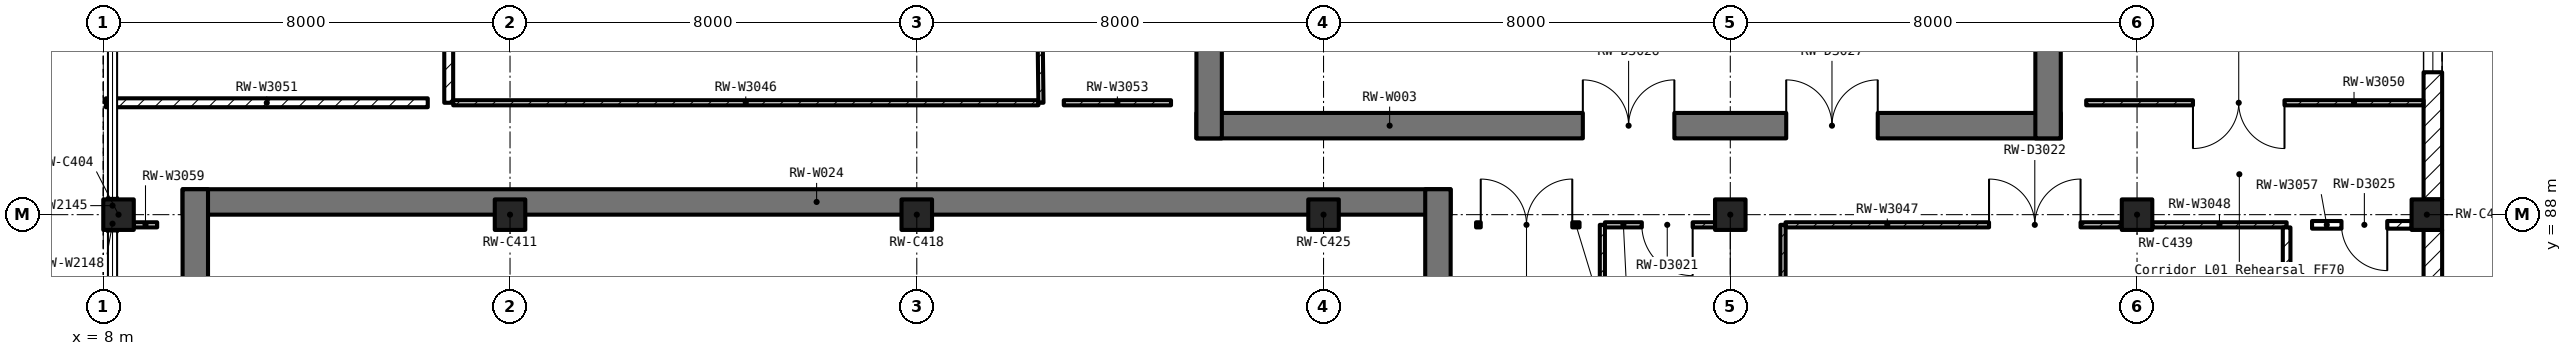
"""IFC4 building model, lengths in metres.
Left out: names, types, materials, properties, quantities, classifications, styles, units other than length and angle.
Written with IfcOpenShell. Run it as: python <this file> out.ifc"""

import sys

from ifc_helpers import new_model, si_unit, direction, frame, frame_2d, origin, origin_2d, place, context, subcontext, project, spatial, rectangle, extrude, element, fill, save


model = new_model("IFC4")
c1 = context("Model", 3, precision=1e-05, world=origin(), true_north=direction((0.0, 1.0)))
c2 = subcontext(c1, "Body", "Model", "MODEL_VIEW")
j1 = project(units=[si_unit("LENGTHUNIT", "METRE"), si_unit("PLANEANGLEUNIT", "RADIAN")], contexts=[c1])
p1 = place(None, origin())
s1 = spatial("IfcSite", under=j1, at=p1, CompositionType="ELEMENT")
p2 = place(p1, origin())
s2 = spatial("IfcBuilding", under=s1, at=p2, CompositionType="ELEMENT")
p3 = place(p2, frame((0.0, 0.0, 6.0)))
s3 = spatial("IfcBuildingStorey", under=s2, at=p3, CompositionType="ELEMENT", Elevation=6.0)
for number, where, z_axis, x_axis in (
    (1, (8.3, 88.0, 0.0), (0.0, 0.0, 1.0), (1.0, 0.0, 0.0)),
    (2, (16.0, 88.0, 0.0), (0.0, 0.0, 1.0), (1.0, 0.0, 0.0)),
    (3, (24.0, 88.0, 0.0), (0.0, 0.0, 1.0), (1.0, 0.0, 0.0)),
    (4, (32.0, 88.0, 0.0), (0.0, 0.0, 1.0), (1.0, 0.0, 0.0)),
    (5, (40.0, 88.0, 0.0), (0.0, 0.0, 1.0), (1.0, 0.0, 0.0)),
    (6, (48.0, 88.0, 0.0), (0.0, 0.0, 1.0), (1.0, 0.0, 0.0)),
    (7, (53.7, 88.0, 0.0), (0.0, 0.0, 1.0), (1.0, 0.0, 0.0)),
):
    element("IfcColumn", number, at=place(p3, frame(where, z_axis=z_axis, x_axis=x_axis)), inside=s3, PredefinedType="COLUMN", context=c2, shape_type="SweptSolid", body=[
        extrude(rectangle(XDim=0.6, YDim=0.6, at=origin_2d()), origin(), (0.0, 0.0, 1.0), 5.5),
    ])
p4 = place(p3, frame((29.5, 89.75, 0.0), z_axis=(0.0, 0.0, 1.0), x_axis=(1.0, 0.0, 0.0)))
e8 = element("IfcWall", 8, at=p4, inside=s3, PredefinedType="SHEAR", context=c2, shape_type="SweptSolid", body=[
    extrude(rectangle(XDim=17.0, YDim=0.5, at=frame_2d((8.5, 0.0))), origin(), (0.0, 0.0, 1.0), 5.5),
])
p5 = place(p4, frame((7.6, 0.0, 0.0)))
e9 = element("IfcOpeningElement", 9, at=p5, cuts=e8, PredefinedType="OPENING", context=c2, shape_type="SweptSolid", body=[
    extrude(rectangle(XDim=1.8, YDim=2.1, at=frame_2d((0.9, 1.05))), frame((0.0, 0.262, 0.0), z_axis=(0.0, -1.0, 0.0), x_axis=(1.0, 0.0, 0.0)), (0.0, 0.0, 1.0), 0.524),
])
p6 = place(p4, frame((11.6, 0.0, 0.0)))
e10 = element("IfcOpeningElement", 10, at=p6, cuts=e8, PredefinedType="OPENING", context=c2, shape_type="SweptSolid", body=[
    extrude(rectangle(XDim=1.8, YDim=2.1, at=frame_2d((0.9, 1.05))), frame((0.0, 0.262, 0.0), z_axis=(0.0, -1.0, 0.0), x_axis=(1.0, 0.0, 0.0)), (0.0, 0.0, 1.0), 0.524),
])
for number, where, z_axis, x_axis in (
    (11, (29.75, 89.5, 0.0), (0.0, 0.0, 1.0), (0.0, 1.0, 0.0)),
    (12, (46.25, 89.5, 0.0), (0.0, 0.0, 1.0), (0.0, 1.0, 0.0)),
):
    element("IfcWall", number, at=place(p3, frame(where, z_axis=z_axis, x_axis=x_axis)), inside=s3, PredefinedType="SHEAR", context=c2, shape_type="SweptSolid", body=[
        extrude(rectangle(XDim=21.0, YDim=0.5, at=frame_2d((10.5, 0.0))), origin(), (0.0, 0.0, 1.0), 5.5),
    ])
p7 = place(p3, frame((9.56, 88.25, 0.0), z_axis=(0.0, 0.0, 1.0), x_axis=(1.0, 0.0, 0.0)))
e13 = element("IfcWall", 13, at=p7, inside=s3, PredefinedType="SHEAR", context=c2, shape_type="SweptSolid", body=[
    extrude(rectangle(XDim=24.94, YDim=0.5, at=frame_2d((12.47, 0.0))), origin(), (0.0, 0.0, 1.0), 5.5),
])
for number, where, z_axis, x_axis in (
    (14, (9.81, 65.5, 0.0), (0.0, 0.0, 1.0), (0.0, 1.0, 0.0)),
    (15, (34.25, 65.5, 0.0), (0.0, 0.0, 1.0), (0.0, 1.0, 0.0)),
):
    element("IfcWall", number, at=place(p3, frame(where, z_axis=z_axis, x_axis=x_axis)), inside=s3, PredefinedType="SHEAR", context=c2, shape_type="SweptSolid", body=[
        extrude(rectangle(XDim=23.0, YDim=0.5, at=frame_2d((11.5, 0.0))), origin(), (0.0, 0.0, 1.0), 5.5),
    ])
p8 = place(p3, frame((53.818, 80.243, 0.0), z_axis=(0.0, 0.0, 1.0), x_axis=(0.0, 1.0, 0.0)))
e16 = element("IfcWall", 16, at=p8, inside=s3, PredefinedType="SOLIDWALL", context=c2, shape_type="SweptSolid", body=[
    extrude(rectangle(XDim=7.457, YDim=0.365, at=frame_2d((3.729, 0.0))), origin(), (0.0, 0.0, 1.0), 4.55),
])
p9 = place(p8, frame((2.529, 0.0, 1.0)))
e17 = element("IfcOpeningElement", 17, at=p9, cuts=e16, PredefinedType="OPENING", context=c2, shape_type="SweptSolid", body=[
    extrude(rectangle(XDim=2.4, YDim=2.0, at=frame_2d((1.2, 1.0))), frame((0.0, 0.195, 0.0), z_axis=(0.0, -1.0, 0.0), x_axis=(1.0, 0.0, 0.0)), (0.0, 0.0, 1.0), 0.389),
])
p10 = place(p3, frame((53.818, 88.3, 0.0), z_axis=(0.0, 0.0, 1.0), x_axis=(0.0, 1.0, 0.0)))
e18 = element("IfcWall", 18, at=p10, inside=s3, PredefinedType="SOLIDWALL", context=c2, shape_type="SweptSolid", body=[
    extrude(rectangle(XDim=7.4, YDim=0.365, at=frame_2d((3.7, 0.0))), origin(), (0.0, 0.0, 1.0), 4.55),
])
p11 = place(p10, frame((2.5, 0.0, 1.0)))
e19 = element("IfcOpeningElement", 19, at=p11, cuts=e18, PredefinedType="OPENING", context=c2, shape_type="SweptSolid", body=[
    extrude(rectangle(XDim=2.4, YDim=2.0, at=frame_2d((1.2, 1.0))), frame((0.0, 0.195, 0.0), z_axis=(0.0, -1.0, 0.0), x_axis=(1.0, 0.0, 0.0)), (0.0, 0.0, 1.0), 0.389),
])
for number, where, z_axis, x_axis in (
    (20, (37.484, 87.8, 0.0), (0.0, 0.0, 1.0), (0.0, -1.0, 0.0)),
    (21, (41.037, 64.05, 0.0), (0.0, 0.0, 1.0), (0.0, 1.0, 0.0)),
):
    element("IfcWall", number, at=place(p3, frame(where, z_axis=z_axis, x_axis=x_axis)), inside=s3, PredefinedType="PARTITIONING", context=c2, shape_type="SweptSolid", body=[
        extrude(rectangle(XDim=23.75, YDim=0.1, at=frame_2d((11.875, 0.0))), origin(), (0.0, 0.0, 1.0), 4.45),
    ])
p12 = place(p3, frame((14.794, 98.7, 0.0), z_axis=(0.0, 0.0, 1.0), x_axis=(0.0, -1.0, 0.0)))
e22 = element("IfcWall", 22, at=p12, inside=s3, PredefinedType="PARTITIONING", context=c2, shape_type="SweptSolid", body=[
    extrude(rectangle(XDim=8.5, YDim=0.175, at=frame_2d((4.25, 0.0))), origin(), (0.0, 0.0, 1.0), 4.45),
])
p13 = place(p3, frame((26.188, 111.634, 0.0), z_axis=(0.0, 0.0, 1.0), x_axis=(0.011845080966, -0.999929844568, 0.0)))
e23 = element("IfcWall", 23, at=p13, inside=s3, PredefinedType="PARTITIONING", context=c2, shape_type="SweptSolid", body=[
    extrude(rectangle(XDim=21.436, YDim=0.1, at=frame_2d((10.718, 0.0))), origin(), (0.0, 0.0, 1.0), 4.45),
])
p14 = place(p3, frame((26.391, 90.2, 0.0), z_axis=(0.0, 0.0, 1.0), x_axis=(-1.0, 0.0, 0.0)))
e24 = element("IfcWall", 24, at=p14, inside=s3, PredefinedType="PARTITIONING", context=c2, shape_type="SweptSolid", body=[
    extrude(rectangle(XDim=11.509, YDim=0.1, at=frame_2d((5.754, 0.0))), origin(), (0.0, 0.0, 1.0), 4.45),
])
p15 = place(p3, frame((41.087, 87.8, 0.0), z_axis=(0.0, 0.0, 1.0), x_axis=(1.0, 0.0, 0.0)))
e25 = element("IfcWall", 25, at=p15, inside=s3, PredefinedType="PARTITIONING", context=c2, shape_type="SweptSolid", body=[
    extrude(rectangle(XDim=6.613, YDim=0.1, at=frame_2d((3.307, 0.0))), origin(), (0.0, 0.0, 1.0), 4.45),
])
p16 = place(p15, frame((4.002, 0.0, 0.0)))
e26 = element("IfcOpeningElement", 26, at=p16, cuts=e25, PredefinedType="OPENING", context=c2, shape_type="SweptSolid", body=[
    extrude(rectangle(XDim=1.8, YDim=2.1, at=frame_2d((0.9, 1.05))), frame((0.0, 0.062, 0.0), z_axis=(0.0, -1.0, 0.0), x_axis=(1.0, 0.0, 0.0)), (0.0, 0.0, 1.0), 0.124),
])
p17 = place(p3, frame((48.3, 87.8, 0.0), z_axis=(0.0, 0.0, 1.0), x_axis=(1.0, 0.0, 0.0)))
e27 = element("IfcWall", 27, at=p17, inside=s3, PredefinedType="PARTITIONING", context=c2, shape_type="SweptSolid", body=[
    extrude(rectangle(XDim=2.642, YDim=0.1, at=frame_2d((1.321, 0.0))), origin(), (0.0, 0.0, 1.0), 4.45),
])
p18 = place(p3, frame((53.635, 90.2, 0.0), z_axis=(0.0, 0.0, 1.0), x_axis=(-1.0, 0.0, 0.0)))
e28 = element("IfcWall", 28, at=p18, inside=s3, PredefinedType="PARTITIONING", context=c2, shape_type="SweptSolid", body=[
    extrude(rectangle(XDim=6.635, YDim=0.1, at=frame_2d((3.317, 0.0))), origin(), (0.0, 0.0, 1.0), 4.45),
])
p19 = place(p18, frame((2.735, 0.0, 0.0)))
e29 = element("IfcOpeningElement", 29, at=p19, cuts=e28, PredefinedType="OPENING", context=c2, shape_type="SweptSolid", body=[
    extrude(rectangle(XDim=1.8, YDim=2.1, at=frame_2d((0.9, 1.05))), frame((0.0, 0.062, 0.0), z_axis=(0.0, -1.0, 0.0), x_axis=(1.0, 0.0, 0.0)), (0.0, 0.0, 1.0), 0.124),
])
p20 = place(p3, frame((14.382, 90.2, 0.0), z_axis=(0.0, 0.0, 1.0), x_axis=(-1.0, 0.0, 0.0)))
e30 = element("IfcWall", 30, at=p20, inside=s3, PredefinedType="PARTITIONING", context=c2, shape_type="SweptSolid", body=[
    extrude(rectangle(XDim=6.332, YDim=0.175, at=frame_2d((3.166, 0.0))), origin(), (0.0, 0.0, 1.0), 4.45),
])
p21 = place(p3, frame((29.0, 90.2, 0.0), z_axis=(0.0, 0.0, 1.0), x_axis=(-1.0, 0.0, 0.0)))
e31 = element("IfcWall", 31, at=p21, inside=s3, PredefinedType="PARTITIONING", context=c2, shape_type="SweptSolid", body=[
    extrude(rectangle(XDim=2.109, YDim=0.1, at=frame_2d((1.054, 0.0))), origin(), (0.0, 0.0, 1.0), 4.45),
])
p22 = place(p3, frame((39.7, 87.8, 0.0), z_axis=(0.0, 0.0, 1.0), x_axis=(-1.0, 0.0, 0.0)))
e32 = element("IfcWall", 32, at=p22, inside=s3, PredefinedType="PARTITIONING", context=c2, shape_type="SweptSolid", body=[
    extrude(rectangle(XDim=2.165, YDim=0.1, at=frame_2d((1.083, 0.0))), origin(), (0.0, 0.0, 1.0), 4.45),
])
p23 = place(p22, frame((0.44, 0.0, 0.0)))
e33 = element("IfcOpeningElement", 33, at=p23, cuts=e32, PredefinedType="OPENING", context=c2, shape_type="SweptSolid", body=[
    extrude(rectangle(XDim=1.0, YDim=2.1, at=frame_2d((0.5, 1.05))), frame((0.0, 0.062, 0.0), z_axis=(0.0, -1.0, 0.0), x_axis=(1.0, 0.0, 0.0)), (0.0, 0.0, 1.0), 0.124),
])
p24 = place(p3, frame((35.0, 87.8, 0.0), z_axis=(0.0, 0.0, 1.0), x_axis=(1.0, 0.0, 0.0)))
e34 = element("IfcWall", 34, at=p24, inside=s3, PredefinedType="PARTITIONING", context=c2, shape_type="SweptSolid", body=[
    extrude(rectangle(XDim=2.035, YDim=0.1, at=frame_2d((1.018, 0.0))), origin(), (0.0, 0.0, 1.0), 4.45),
])
p25 = place(p24, frame((0.092, 0.0, 0.0)))
e35 = element("IfcOpeningElement", 35, at=p25, cuts=e34, PredefinedType="OPENING", context=c2, shape_type="SweptSolid", body=[
    extrude(rectangle(XDim=1.8, YDim=2.1, at=frame_2d((0.9, 1.05))), frame((0.0, 0.062, 0.0), z_axis=(0.0, -1.0, 0.0), x_axis=(1.0, 0.0, 0.0)), (0.0, 0.0, 1.0), 0.124),
])
p26 = place(p3, frame((53.4, 87.8, 0.0), z_axis=(0.0, 0.0, 1.0), x_axis=(-1.0, 0.0, 0.0)))
e36 = element("IfcWall", 36, at=p26, inside=s3, PredefinedType="PARTITIONING", context=c2, shape_type="SweptSolid", body=[
    extrude(rectangle(XDim=1.958, YDim=0.15, at=frame_2d((0.979, 0.0))), origin(), (0.0, 0.0, 1.0), 4.45),
])
p27 = place(p26, frame((0.479, 0.0, 0.0)))
e37 = element("IfcOpeningElement", 37, at=p27, cuts=e36, PredefinedType="OPENING", context=c2, shape_type="SweptSolid", body=[
    extrude(rectangle(XDim=0.9, YDim=2.1, at=frame_2d((0.45, 1.05))), frame((0.0, 0.087, 0.0), z_axis=(0.0, -1.0, 0.0), x_axis=(1.0, 0.0, 0.0)), (0.0, 0.0, 1.0), 0.174),
])
p28 = place(p3, frame((50.942, 87.749, 0.0), z_axis=(0.0, 0.0, 1.0), x_axis=(0.0, -1.0, 0.0)))
e38 = element("IfcWall", 38, at=p28, inside=s3, PredefinedType="PARTITIONING", context=c2, shape_type="SweptSolid", body=[
    extrude(rectangle(XDim=2.066, YDim=0.15, at=frame_2d((1.033, 0.0))), origin(), (0.0, 0.0, 1.0), 4.45),
])
p29 = place(p3, frame((8.601, 87.8, 0.0), z_axis=(0.0, 0.0, 1.0), x_axis=(1.0, 0.0, 0.0)))
e39 = element("IfcWall", 39, at=p29, inside=s3, PredefinedType="PARTITIONING", context=c2, shape_type="SweptSolid", body=[
    extrude(rectangle(XDim=0.459, YDim=0.1, at=frame_2d((0.229, 0.0))), origin(), (0.0, 0.0, 1.0), 4.45),
])
for number, where, z_axis, x_axis in (
    (40, (8.182, 88.33, 0.0), (0.0, 0.0, 1.0), (0.0, -1.0, 0.0)),
    (41, (8.182, 87.67, 0.0), (0.0, 0.0, 1.0), (0.0, 1.0, 0.0)),
):
    element("IfcWall", number, at=place(p3, frame(where, z_axis=z_axis, x_axis=x_axis)), inside=s3, PredefinedType="SOLIDWALL", context=c2, shape_type="SweptSolid", body=[
        extrude(rectangle(XDim=0.305, YDim=0.18, at=frame_2d((0.153, 0.0))), origin(), (0.0, 0.0, 1.0), 3.7),
    ])
p30 = place(p11, origin())
e42 = element("IfcWindow", 42, at=p30, inside=s3, PartitioningType="DOUBLE_PANEL_VERTICAL", PredefinedType="WINDOW", context=c2, shape_type="SweptSolid", body=[
    extrude(rectangle(XDim=2.4, YDim=2.0, at=frame_2d((1.2, 1.0))), frame((0.0, 0.03, 0.0), z_axis=(0.0, -1.0, 0.0), x_axis=(1.0, 0.0, 0.0)), (0.0, 0.0, 1.0), 0.06),
])
fill(e19, e42)
p31 = place(p25, origin())
e43 = element("IfcDoor", 43, at=p31, inside=s3, OperationType="DOUBLE_DOOR_SINGLE_SWING", PredefinedType="DOOR", context=c2, shape_type="SweptSolid", body=[
    extrude(rectangle(XDim=1.8, YDim=2.1, at=frame_2d((0.9, 1.05))), frame((0.0, 0.025, 0.0), z_axis=(0.0, -1.0, 0.0), x_axis=(1.0, 0.0, 0.0)), (0.0, 0.0, 1.0), 0.05),
])
fill(e35, e43)
p32 = place(p23, origin())
e44 = element("IfcDoor", 44, at=p32, inside=s3, OperationType="SINGLE_SWING_LEFT", PredefinedType="DOOR", context=c2, shape_type="SweptSolid", body=[
    extrude(rectangle(XDim=1.0, YDim=2.1, at=frame_2d((0.5, 1.05))), frame((0.0, 0.025, 0.0), z_axis=(0.0, -1.0, 0.0), x_axis=(1.0, 0.0, 0.0)), (0.0, 0.0, 1.0), 0.05),
])
fill(e33, e44)
p33 = place(p16, origin())
e45 = element("IfcDoor", 45, at=p33, inside=s3, OperationType="DOUBLE_DOOR_SINGLE_SWING", PredefinedType="DOOR", context=c2, shape_type="SweptSolid", body=[
    extrude(rectangle(XDim=1.8, YDim=2.1, at=frame_2d((0.9, 1.05))), frame((0.0, 0.025, 0.0), z_axis=(0.0, -1.0, 0.0), x_axis=(1.0, 0.0, 0.0)), (0.0, 0.0, 1.0), 0.05),
])
fill(e26, e45)
p34 = place(p19, origin())
e46 = element("IfcDoor", 46, at=p34, inside=s3, OperationType="DOUBLE_DOOR_SINGLE_SWING", PredefinedType="DOOR", context=c2, shape_type="SweptSolid", body=[
    extrude(rectangle(XDim=1.8, YDim=2.1, at=frame_2d((0.9, 1.05))), frame((0.0, 0.025, 0.0), z_axis=(0.0, -1.0, 0.0), x_axis=(1.0, 0.0, 0.0)), (0.0, 0.0, 1.0), 0.05),
])
fill(e29, e46)
p35 = place(p27, origin())
e47 = element("IfcDoor", 47, at=p35, inside=s3, OperationType="SINGLE_SWING_LEFT", PredefinedType="DOOR", context=c2, shape_type="SweptSolid", body=[
    extrude(rectangle(XDim=0.9, YDim=2.1, at=frame_2d((0.45, 1.05))), frame((0.0, 0.025, 0.0), z_axis=(0.0, -1.0, 0.0), x_axis=(1.0, 0.0, 0.0)), (0.0, 0.0, 1.0), 0.05),
])
fill(e37, e47)
p36 = place(p5, origin())
e48 = element("IfcDoor", 48, at=p36, inside=s3, OperationType="DOUBLE_DOOR_SINGLE_SWING", PredefinedType="DOOR", context=c2, shape_type="SweptSolid", body=[
    extrude(rectangle(XDim=1.8, YDim=2.1, at=frame_2d((0.9, 1.05))), frame((0.0, 0.025, 0.0), z_axis=(0.0, -1.0, 0.0), x_axis=(1.0, 0.0, 0.0)), (0.0, 0.0, 1.0), 0.05),
])
fill(e9, e48)
p37 = place(p6, origin())
e49 = element("IfcDoor", 49, at=p37, inside=s3, OperationType="DOUBLE_DOOR_SINGLE_SWING", PredefinedType="DOOR", context=c2, shape_type="SweptSolid", body=[
    extrude(rectangle(XDim=1.8, YDim=2.1, at=frame_2d((0.9, 1.05))), frame((0.0, 0.025, 0.0), z_axis=(0.0, -1.0, 0.0), x_axis=(1.0, 0.0, 0.0)), (0.0, 0.0, 1.0), 0.05),
])
fill(e10, e49)
save(model, sys.argv[1])
